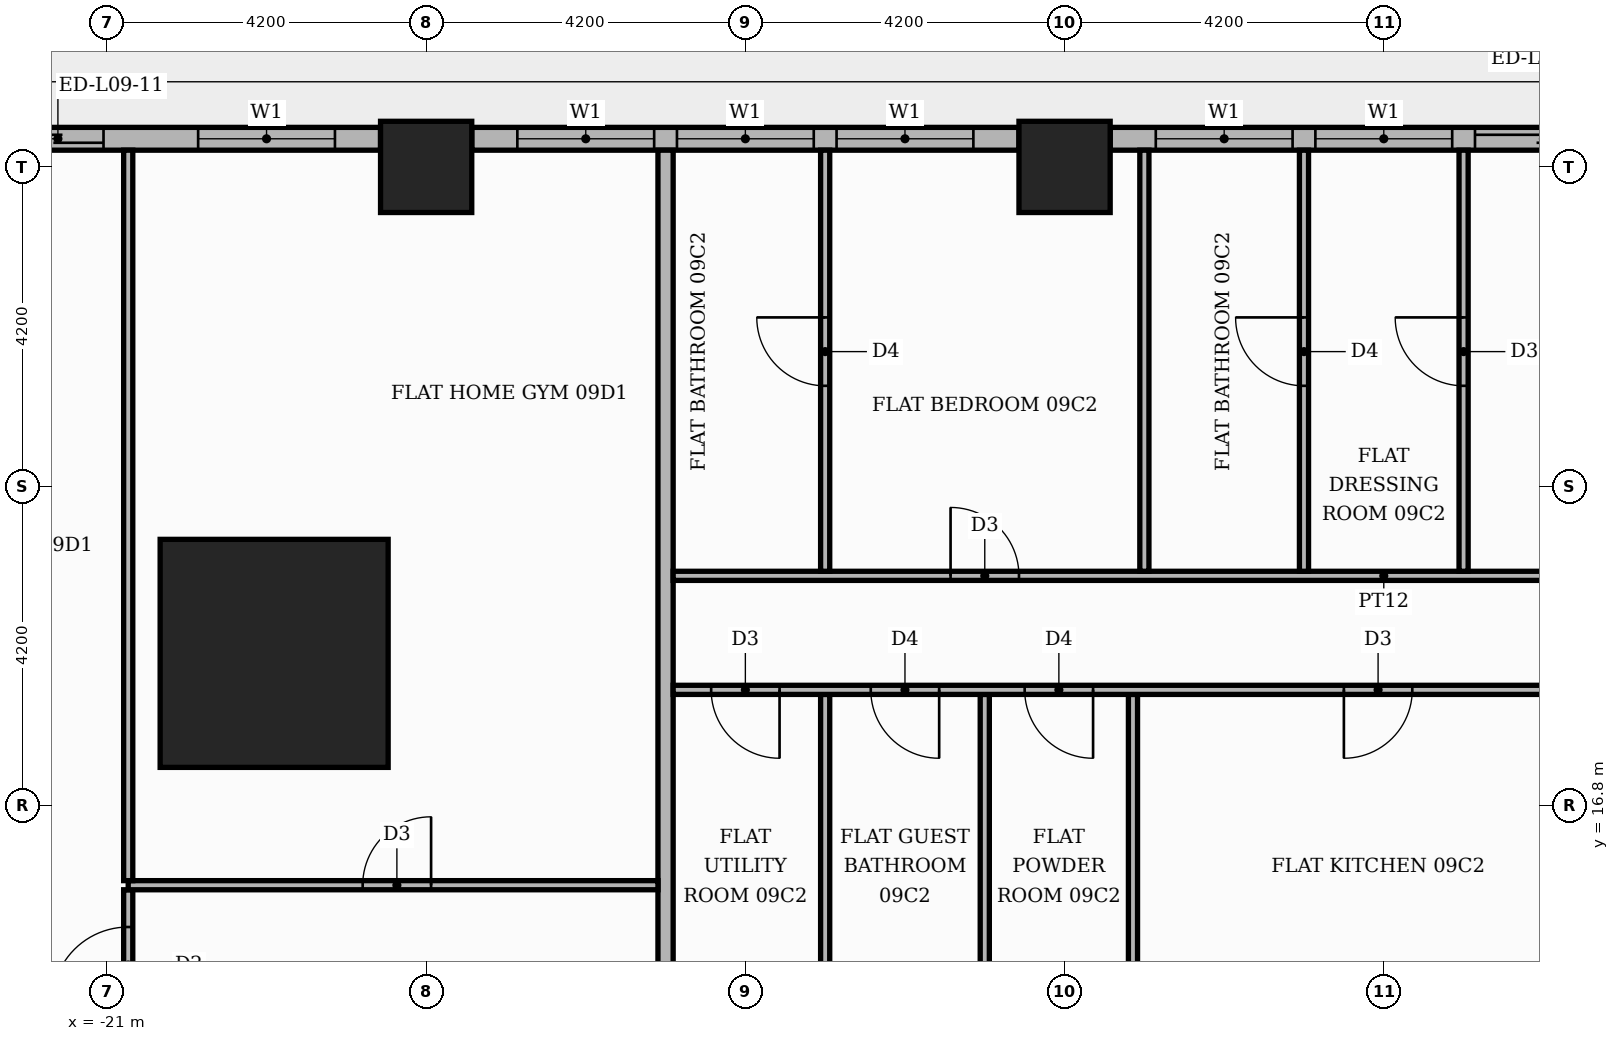
"""IFC4 building model, lengths in metres.
Left out: names, types, materials, properties, quantities, classifications, styles, units other than length and angle.
Written with IfcOpenShell. Run it as: python <this file> out.ifc"""

import sys

from ifc_helpers import new_model, si_unit, direction, frame, frame_2d, origin, origin_2d, place, context, subcontext, project, spatial, rectangle, extrude, element, fill, save


model = new_model("IFC4")
c1 = context("Model", 3, precision=1e-05, world=origin(), true_north=direction((0.0, 1.0)))
c2 = subcontext(c1, "Body", "Model", "MODEL_VIEW")
j1 = project(units=[si_unit("LENGTHUNIT", "METRE"), si_unit("PLANEANGLEUNIT", "RADIAN")], contexts=[c1])
p1 = place(None, origin())
s1 = spatial("IfcSite", under=j1, at=p1, CompositionType="ELEMENT")
p2 = place(p1, origin())
s2 = spatial("IfcBuilding", under=s1, at=p2, CompositionType="ELEMENT")
p3 = place(p2, frame((0.0, 0.0, 42.6)))
s3 = spatial("IfcBuildingStorey", under=s2, at=p3, CompositionType="ELEMENT", Elevation=42.6)
p4 = place(p3, frame((-18.8, 18.8, 0.0), z_axis=(0.0, 0.0, 1.0), x_axis=(1.0, 0.0, 0.0)))
e1 = element("IfcColumn", 1, at=p4, inside=s3, PredefinedType="COLUMN", context=c2, shape_type="SweptSolid", body=[
    extrude(rectangle(XDim=3.0, YDim=3.0, at=origin_2d()), origin(), (0.0, 0.0, 1.0), 3.9),
])
for number, where, z_axis, x_axis in (
    (2, (-8.4, 25.2, 0.0), (0.0, 0.0, 1.0), (1.0, 0.0, 0.0)),
    (3, (-16.8, 25.2, 0.0), (0.0, 0.0, 1.0), (1.0, 0.0, 0.0)),
):
    element("IfcColumn", number, at=place(p3, frame(where, z_axis=z_axis, x_axis=x_axis)), inside=s3, PredefinedType="COLUMN", context=c2, shape_type="SweptSolid", body=[
        extrude(rectangle(XDim=1.2, YDim=1.2, at=origin_2d()), origin(), (0.0, 0.0, 1.0), 3.9),
    ])
p5 = place(p3, frame((-0.6, 25.57, 0.0), z_axis=(0.0, 0.0, 1.0), x_axis=(-1.0, 0.0, 0.0)))
e4 = element("IfcWall", 4, at=p5, inside=s3, PredefinedType="STANDARD", context=c2, shape_type="SweptSolid", body=[
    extrude(rectangle(XDim=7.2, YDim=0.3, at=frame_2d((3.6, 0.0))), origin(), (0.0, 0.0, 1.0), 3.48),
])
p6 = place(p5, frame((0.6, 0.0, 0.0)))
e5 = element("IfcOpeningElement", 5, at=p6, cuts=e4, PredefinedType="OPENING", context=c2, shape_type="SweptSolid", body=[
    extrude(rectangle(XDim=1.8, YDim=2.4, at=frame_2d((0.9, 1.2))), frame((0.0, 0.16, 0.0), z_axis=(0.0, -1.0, 0.0), x_axis=(1.0, 0.0, 0.0)), (0.0, 0.0, 1.0), 0.32),
])
p7 = place(p5, frame((2.7, 0.0, 0.9)))
e6 = element("IfcOpeningElement", 6, at=p7, cuts=e4, PredefinedType="OPENING", context=c2, shape_type="SweptSolid", body=[
    extrude(rectangle(XDim=1.8, YDim=2.1, at=frame_2d((0.9, 1.05))), frame((0.0, 0.16, 0.0), z_axis=(0.0, -1.0, 0.0), x_axis=(1.0, 0.0, 0.0)), (0.0, 0.0, 1.0), 0.32),
])
p8 = place(p5, frame((4.8, 0.0, 0.9)))
e7 = element("IfcOpeningElement", 7, at=p8, cuts=e4, PredefinedType="OPENING", context=c2, shape_type="SweptSolid", body=[
    extrude(rectangle(XDim=1.8, YDim=2.1, at=frame_2d((0.9, 1.05))), frame((0.0, 0.16, 0.0), z_axis=(0.0, -1.0, 0.0), x_axis=(1.0, 0.0, 0.0)), (0.0, 0.0, 1.0), 0.32),
])
p9 = place(p3, frame((-9.0, 25.57, 0.0), z_axis=(0.0, 0.0, 1.0), x_axis=(-1.0, 0.0, 0.0)))
e8 = element("IfcWall", 8, at=p9, inside=s3, PredefinedType="STANDARD", context=c2, shape_type="SweptSolid", body=[
    extrude(rectangle(XDim=7.2, YDim=0.3, at=frame_2d((3.6, 0.0))), origin(), (0.0, 0.0, 1.0), 3.48),
])
p10 = place(p9, frame((0.6, 0.0, 0.9)))
e9 = element("IfcOpeningElement", 9, at=p10, cuts=e8, PredefinedType="OPENING", context=c2, shape_type="SweptSolid", body=[
    extrude(rectangle(XDim=1.8, YDim=2.1, at=frame_2d((0.9, 1.05))), frame((0.0, 0.16, 0.0), z_axis=(0.0, -1.0, 0.0), x_axis=(1.0, 0.0, 0.0)), (0.0, 0.0, 1.0), 0.32),
])
p11 = place(p9, frame((2.7, 0.0, 0.9)))
e10 = element("IfcOpeningElement", 10, at=p11, cuts=e8, PredefinedType="OPENING", context=c2, shape_type="SweptSolid", body=[
    extrude(rectangle(XDim=1.8, YDim=2.1, at=frame_2d((0.9, 1.05))), frame((0.0, 0.16, 0.0), z_axis=(0.0, -1.0, 0.0), x_axis=(1.0, 0.0, 0.0)), (0.0, 0.0, 1.0), 0.32),
])
p12 = place(p9, frame((4.8, 0.0, 0.9)))
e11 = element("IfcOpeningElement", 11, at=p12, cuts=e8, PredefinedType="OPENING", context=c2, shape_type="SweptSolid", body=[
    extrude(rectangle(XDim=1.8, YDim=2.1, at=frame_2d((0.9, 1.05))), frame((0.0, 0.16, 0.0), z_axis=(0.0, -1.0, 0.0), x_axis=(1.0, 0.0, 0.0)), (0.0, 0.0, 1.0), 0.32),
])
p13 = place(p3, frame((-17.4, 25.57, 0.0), z_axis=(0.0, 0.0, 1.0), x_axis=(-1.0, 0.0, 0.0)))
e12 = element("IfcWall", 12, at=p13, inside=s3, PredefinedType="STANDARD", context=c2, shape_type="SweptSolid", body=[
    extrude(rectangle(XDim=5.32, YDim=0.3, at=frame_2d((2.66, 0.0))), origin(), (0.0, 0.0, 1.0), 3.48),
])
p14 = place(p13, frame((0.6, 0.0, 0.9)))
e13 = element("IfcOpeningElement", 13, at=p14, cuts=e12, PredefinedType="OPENING", context=c2, shape_type="SweptSolid", body=[
    extrude(rectangle(XDim=1.8, YDim=2.1, at=frame_2d((0.9, 1.05))), frame((0.0, 0.16, 0.0), z_axis=(0.0, -1.0, 0.0), x_axis=(1.0, 0.0, 0.0)), (0.0, 0.0, 1.0), 0.32),
])
p15 = place(p13, frame((3.645, 0.0, 0.0)))
e14 = element("IfcOpeningElement", 14, at=p15, cuts=e12, PredefinedType="OPENING", context=c2, shape_type="SweptSolid", body=[
    extrude(rectangle(XDim=1.2, YDim=2.4, at=frame_2d((0.6, 1.2))), frame((0.0, 0.16, 0.0), z_axis=(0.0, -1.0, 0.0), x_axis=(1.0, 0.0, 0.0)), (0.0, 0.0, 1.0), 0.32),
])
p16 = place(p3, frame((-20.72, 13.71, 0.0), z_axis=(0.0, 0.0, 1.0), x_axis=(0.0, 1.0, 0.0)))
e15 = element("IfcWall", 15, at=p16, inside=s3, PredefinedType="PARTITIONING", context=c2, shape_type="SweptSolid", body=[
    extrude(rectangle(XDim=1.98, YDim=0.12, at=frame_2d((0.99, 0.0))), origin(), (0.0, 0.0, 1.0), 3.48),
])
p17 = place(p16, frame((0.49, 0.0, 0.0)))
e16 = element("IfcOpeningElement", 16, at=p17, cuts=e15, PredefinedType="OPENING", context=c2, shape_type="SweptSolid", body=[
    extrude(rectangle(XDim=1.0, YDim=2.1, at=frame_2d((0.5, 1.05))), frame((0.0, 0.07, 0.0), z_axis=(0.0, -1.0, 0.0), x_axis=(1.0, 0.0, 0.0)), (0.0, 0.0, 1.0), 0.14),
])
p18 = place(p3, frame((-13.65, 13.75, 0.0), z_axis=(0.0, 0.0, 1.0), x_axis=(0.0, 1.0, 0.0)))
e17 = element("IfcWall", 17, at=p18, inside=s3, PredefinedType="PARTITIONING", context=c2, shape_type="SweptSolid", body=[
    extrude(rectangle(XDim=11.67, YDim=0.2, at=frame_2d((5.835, 0.0))), origin(), (0.0, 0.0, 1.0), 3.48),
])
for number, where, z_axis, x_axis in (
    (18, (-11.55, 13.75, 0.0), (0.0, 0.0, 1.0), (0.0, 1.0, 0.0)),
    (19, (-9.45, 13.75, 0.0), (0.0, 0.0, 1.0), (0.0, 1.0, 0.0)),
    (20, (-7.5, 13.75, 0.0), (0.0, 0.0, 1.0), (0.0, 1.0, 0.0)),
):
    element("IfcWall", number, at=place(p3, frame(where, z_axis=z_axis, x_axis=x_axis)), inside=s3, PredefinedType="PARTITIONING", context=c2, shape_type="SweptSolid", body=[
        extrude(rectangle(XDim=4.51, YDim=0.12, at=frame_2d((2.255, 0.0))), origin(), (0.0, 0.0, 1.0), 3.48),
    ])
p19 = place(p3, frame((-20.72, 15.75, 0.0), z_axis=(0.0, 0.0, 1.0), x_axis=(1.0, 0.0, 0.0)))
e21 = element("IfcWall", 21, at=p19, inside=s3, PredefinedType="PARTITIONING", context=c2, shape_type="SweptSolid", body=[
    extrude(rectangle(XDim=6.97, YDim=0.12, at=frame_2d((3.485, 0.0))), origin(), (0.0, 0.0, 1.0), 3.48),
])
p20 = place(p19, frame((3.085, 0.0, 0.0)))
e22 = element("IfcOpeningElement", 22, at=p20, cuts=e21, PredefinedType="OPENING", context=c2, shape_type="SweptSolid", body=[
    extrude(rectangle(XDim=0.9, YDim=2.1, at=frame_2d((0.45, 1.05))), frame((0.0, 0.07, 0.0), z_axis=(0.0, -1.0, 0.0), x_axis=(1.0, 0.0, 0.0)), (0.0, 0.0, 1.0), 0.14),
])
p21 = place(p3, frame((-20.72, 15.81, 0.0), z_axis=(0.0, 0.0, 1.0), x_axis=(0.0, 1.0, 0.0)))
e23 = element("IfcWall", 23, at=p21, inside=s3, PredefinedType="PARTITIONING", context=c2, shape_type="SweptSolid", body=[
    extrude(rectangle(XDim=9.61, YDim=0.12, at=frame_2d((4.805, 0.0))), origin(), (0.0, 0.0, 1.0), 3.48),
])
p22 = place(p3, frame((-13.55, 18.32, 0.0), z_axis=(0.0, 0.0, 1.0), x_axis=(1.0, 0.0, 0.0)))
e24 = element("IfcWall", 24, at=p22, inside=s3, PredefinedType="PARTITIONING", context=c2, shape_type="SweptSolid", body=[
    extrude(rectangle(XDim=12.5, YDim=0.12, at=frame_2d((6.25, 0.0))), origin(), (0.0, 0.0, 1.0), 3.48),
])
p23 = place(p22, frame((8.825, 0.0, 0.0)))
e25 = element("IfcOpeningElement", 25, at=p23, cuts=e24, PredefinedType="OPENING", context=c2, shape_type="SweptSolid", body=[
    extrude(rectangle(XDim=0.9, YDim=2.1, at=frame_2d((0.45, 1.05))), frame((0.0, 0.07, 0.0), z_axis=(0.0, -1.0, 0.0), x_axis=(1.0, 0.0, 0.0)), (0.0, 0.0, 1.0), 0.14),
])
p24 = place(p22, frame((4.625, 0.0, 0.0)))
e26 = element("IfcOpeningElement", 26, at=p24, cuts=e24, PredefinedType="OPENING", context=c2, shape_type="SweptSolid", body=[
    extrude(rectangle(XDim=0.9, YDim=2.1, at=frame_2d((0.45, 1.05))), frame((0.0, 0.07, 0.0), z_axis=(0.0, -1.0, 0.0), x_axis=(1.0, 0.0, 0.0)), (0.0, 0.0, 1.0), 0.14),
])
p25 = place(p22, frame((2.6, 0.0, 0.0)))
e27 = element("IfcOpeningElement", 27, at=p25, cuts=e24, PredefinedType="OPENING", context=c2, shape_type="SweptSolid", body=[
    extrude(rectangle(XDim=0.9, YDim=2.1, at=frame_2d((0.45, 1.05))), frame((0.0, 0.07, 0.0), z_axis=(0.0, -1.0, 0.0), x_axis=(1.0, 0.0, 0.0)), (0.0, 0.0, 1.0), 0.14),
])
p26 = place(p22, frame((0.5, 0.0, 0.0)))
e28 = element("IfcOpeningElement", 28, at=p26, cuts=e24, PredefinedType="OPENING", context=c2, shape_type="SweptSolid", body=[
    extrude(rectangle(XDim=0.9, YDim=2.1, at=frame_2d((0.45, 1.05))), frame((0.0, 0.07, 0.0), z_axis=(0.0, -1.0, 0.0), x_axis=(1.0, 0.0, 0.0)), (0.0, 0.0, 1.0), 0.14),
])
p27 = place(p3, frame((-13.55, 19.82, 0.0), z_axis=(0.0, 0.0, 1.0), x_axis=(1.0, 0.0, 0.0)))
e29 = element("IfcWall", 29, at=p27, inside=s3, PredefinedType="PARTITIONING", context=c2, shape_type="SweptSolid", body=[
    extrude(rectangle(XDim=18.7, YDim=0.12, at=frame_2d((9.35, 0.0))), origin(), (0.0, 0.0, 1.0), 3.48),
])
p28 = place(p27, frame((16.2, 0.0, 0.0)))
e30 = element("IfcOpeningElement", 30, at=p28, cuts=e29, PredefinedType="OPENING", context=c2, shape_type="SweptSolid", body=[
    extrude(rectangle(XDim=1.0, YDim=2.1, at=frame_2d((0.5, 1.05))), frame((0.0, 0.07, 0.0), z_axis=(0.0, -1.0, 0.0), x_axis=(1.0, 0.0, 0.0)), (0.0, 0.0, 1.0), 0.14),
])
p29 = place(p27, frame((12.05, 0.0, 0.0)))
e31 = element("IfcOpeningElement", 31, at=p29, cuts=e29, PredefinedType="OPENING", context=c2, shape_type="SweptSolid", body=[
    extrude(rectangle(XDim=0.9, YDim=2.1, at=frame_2d((0.45, 1.05))), frame((0.0, 0.07, 0.0), z_axis=(0.0, -1.0, 0.0), x_axis=(1.0, 0.0, 0.0)), (0.0, 0.0, 1.0), 0.14),
])
p30 = place(p27, frame((3.65, 0.0, 0.0)))
e32 = element("IfcOpeningElement", 32, at=p30, cuts=e29, PredefinedType="OPENING", context=c2, shape_type="SweptSolid", body=[
    extrude(rectangle(XDim=0.9, YDim=2.1, at=frame_2d((0.45, 1.05))), frame((0.0, 0.07, 0.0), z_axis=(0.0, -1.0, 0.0), x_axis=(1.0, 0.0, 0.0)), (0.0, 0.0, 1.0), 0.14),
])
p31 = place(p3, frame((-11.55, 19.88, 0.0), z_axis=(0.0, 0.0, 1.0), x_axis=(0.0, 1.0, 0.0)))
e33 = element("IfcWall", 33, at=p31, inside=s3, PredefinedType="PARTITIONING", context=c2, shape_type="SweptSolid", body=[
    extrude(rectangle(XDim=5.54, YDim=0.12, at=frame_2d((2.77, 0.0))), origin(), (0.0, 0.0, 1.0), 3.48),
])
p32 = place(p31, frame((2.44, 0.0, 0.0)))
e34 = element("IfcOpeningElement", 34, at=p32, cuts=e33, PredefinedType="OPENING", context=c2, shape_type="SweptSolid", body=[
    extrude(rectangle(XDim=0.9, YDim=2.1, at=frame_2d((0.45, 1.05))), frame((0.0, 0.07, 0.0), z_axis=(0.0, -1.0, 0.0), x_axis=(1.0, 0.0, 0.0)), (0.0, 0.0, 1.0), 0.14),
])
p33 = place(p3, frame((-7.35, 19.88, 0.0), z_axis=(0.0, 0.0, 1.0), x_axis=(0.0, 1.0, 0.0)))
e35 = element("IfcWall", 35, at=p33, inside=s3, PredefinedType="PARTITIONING", context=c2, shape_type="SweptSolid", body=[
    extrude(rectangle(XDim=5.54, YDim=0.12, at=frame_2d((2.77, 0.0))), origin(), (0.0, 0.0, 1.0), 3.48),
])
p34 = place(p3, frame((-5.25, 19.88, 0.0), z_axis=(0.0, 0.0, 1.0), x_axis=(0.0, 1.0, 0.0)))
e36 = element("IfcWall", 36, at=p34, inside=s3, PredefinedType="PARTITIONING", context=c2, shape_type="SweptSolid", body=[
    extrude(rectangle(XDim=5.54, YDim=0.12, at=frame_2d((2.77, 0.0))), origin(), (0.0, 0.0, 1.0), 3.48),
])
p35 = place(p34, frame((2.44, 0.0, 0.0)))
e37 = element("IfcOpeningElement", 37, at=p35, cuts=e36, PredefinedType="OPENING", context=c2, shape_type="SweptSolid", body=[
    extrude(rectangle(XDim=0.9, YDim=2.1, at=frame_2d((0.45, 1.05))), frame((0.0, 0.07, 0.0), z_axis=(0.0, -1.0, 0.0), x_axis=(1.0, 0.0, 0.0)), (0.0, 0.0, 1.0), 0.14),
])
p36 = place(p3, frame((-3.15, 19.88, 0.0), z_axis=(0.0, 0.0, 1.0), x_axis=(0.0, 1.0, 0.0)))
e38 = element("IfcWall", 38, at=p36, inside=s3, PredefinedType="PARTITIONING", context=c2, shape_type="SweptSolid", body=[
    extrude(rectangle(XDim=5.54, YDim=0.12, at=frame_2d((2.77, 0.0))), origin(), (0.0, 0.0, 1.0), 3.48),
])
p37 = place(p36, frame((2.44, 0.0, 0.0)))
e39 = element("IfcOpeningElement", 39, at=p37, cuts=e38, PredefinedType="OPENING", context=c2, shape_type="SweptSolid", body=[
    extrude(rectangle(XDim=0.9, YDim=2.1, at=frame_2d((0.45, 1.05))), frame((0.0, 0.07, 0.0), z_axis=(0.0, -1.0, 0.0), x_axis=(1.0, 0.0, 0.0)), (0.0, 0.0, 1.0), 0.14),
])
p38 = place(p6, origin())
e40 = element("IfcDoor", 40, at=p38, inside=s3, OperationType="SLIDING_TO_LEFT", PredefinedType="DOOR", context=c2, shape_type="SweptSolid", body=[
    extrude(rectangle(XDim=1.8, YDim=2.4, at=frame_2d((0.9, 1.2))), frame((0.0, 0.025, 0.0), z_axis=(0.0, -1.0, 0.0), x_axis=(1.0, 0.0, 0.0)), (0.0, 0.0, 1.0), 0.05),
])
fill(e5, e40)
p39 = place(p7, origin())
e41 = element("IfcWindow", 41, at=p39, inside=s3, PartitioningType="SINGLE_PANEL", PredefinedType="WINDOW", context=c2, shape_type="SweptSolid", body=[
    extrude(rectangle(XDim=1.8, YDim=2.1, at=frame_2d((0.9, 1.05))), frame((0.0, 0.03, 0.0), z_axis=(0.0, -1.0, 0.0), x_axis=(1.0, 0.0, 0.0)), (0.0, 0.0, 1.0), 0.06),
])
fill(e6, e41)
p40 = place(p8, origin())
e42 = element("IfcWindow", 42, at=p40, inside=s3, PartitioningType="SINGLE_PANEL", PredefinedType="WINDOW", context=c2, shape_type="SweptSolid", body=[
    extrude(rectangle(XDim=1.8, YDim=2.1, at=frame_2d((0.9, 1.05))), frame((0.0, 0.03, 0.0), z_axis=(0.0, -1.0, 0.0), x_axis=(1.0, 0.0, 0.0)), (0.0, 0.0, 1.0), 0.06),
])
fill(e7, e42)
p41 = place(p10, origin())
e43 = element("IfcWindow", 43, at=p41, inside=s3, PartitioningType="SINGLE_PANEL", PredefinedType="WINDOW", context=c2, shape_type="SweptSolid", body=[
    extrude(rectangle(XDim=1.8, YDim=2.1, at=frame_2d((0.9, 1.05))), frame((0.0, 0.03, 0.0), z_axis=(0.0, -1.0, 0.0), x_axis=(1.0, 0.0, 0.0)), (0.0, 0.0, 1.0), 0.06),
])
fill(e9, e43)
p42 = place(p11, origin())
e44 = element("IfcWindow", 44, at=p42, inside=s3, PartitioningType="SINGLE_PANEL", PredefinedType="WINDOW", context=c2, shape_type="SweptSolid", body=[
    extrude(rectangle(XDim=1.8, YDim=2.1, at=frame_2d((0.9, 1.05))), frame((0.0, 0.03, 0.0), z_axis=(0.0, -1.0, 0.0), x_axis=(1.0, 0.0, 0.0)), (0.0, 0.0, 1.0), 0.06),
])
fill(e10, e44)
p43 = place(p12, origin())
e45 = element("IfcWindow", 45, at=p43, inside=s3, PartitioningType="SINGLE_PANEL", PredefinedType="WINDOW", context=c2, shape_type="SweptSolid", body=[
    extrude(rectangle(XDim=1.8, YDim=2.1, at=frame_2d((0.9, 1.05))), frame((0.0, 0.03, 0.0), z_axis=(0.0, -1.0, 0.0), x_axis=(1.0, 0.0, 0.0)), (0.0, 0.0, 1.0), 0.06),
])
fill(e11, e45)
p44 = place(p14, origin())
e46 = element("IfcWindow", 46, at=p44, inside=s3, PartitioningType="SINGLE_PANEL", PredefinedType="WINDOW", context=c2, shape_type="SweptSolid", body=[
    extrude(rectangle(XDim=1.8, YDim=2.1, at=frame_2d((0.9, 1.05))), frame((0.0, 0.03, 0.0), z_axis=(0.0, -1.0, 0.0), x_axis=(1.0, 0.0, 0.0)), (0.0, 0.0, 1.0), 0.06),
])
fill(e13, e46)
p45 = place(p15, origin())
e47 = element("IfcDoor", 47, at=p45, inside=s3, OperationType="SLIDING_TO_RIGHT", PredefinedType="DOOR", context=c2, shape_type="SweptSolid", body=[
    extrude(rectangle(XDim=1.2, YDim=2.4, at=frame_2d((0.6, 1.2))), frame((0.0, 0.025, 0.0), z_axis=(0.0, -1.0, 0.0), x_axis=(1.0, 0.0, 0.0)), (0.0, 0.0, 1.0), 0.05),
])
fill(e14, e47)
p46 = place(p23, frame((0.9, 0.0, 0.0), z_axis=(0.0, 0.0, 1.0), x_axis=(-1.0, 0.0, 0.0)))
e48 = element("IfcDoor", 48, at=p46, inside=s3, OperationType="SINGLE_SWING_LEFT", PredefinedType="DOOR", context=c2, shape_type="SweptSolid", body=[
    extrude(rectangle(XDim=0.9, YDim=2.1, at=frame_2d((0.45, 1.05))), frame((0.0, 0.025, 0.0), z_axis=(0.0, -1.0, 0.0), x_axis=(1.0, 0.0, 0.0)), (0.0, 0.0, 1.0), 0.05),
])
fill(e25, e48)
p47 = place(p24, frame((0.9, 0.0, 0.0), z_axis=(0.0, 0.0, 1.0), x_axis=(-1.0, 0.0, 0.0)))
e49 = element("IfcDoor", 49, at=p47, inside=s3, OperationType="SINGLE_SWING_RIGHT", PredefinedType="DOOR", context=c2, shape_type="SweptSolid", body=[
    extrude(rectangle(XDim=0.9, YDim=2.1, at=frame_2d((0.45, 1.05))), frame((0.0, 0.025, 0.0), z_axis=(0.0, -1.0, 0.0), x_axis=(1.0, 0.0, 0.0)), (0.0, 0.0, 1.0), 0.05),
])
fill(e26, e49)
p48 = place(p25, frame((0.9, 0.0, 0.0), z_axis=(0.0, 0.0, 1.0), x_axis=(-1.0, 0.0, 0.0)))
e50 = element("IfcDoor", 50, at=p48, inside=s3, OperationType="SINGLE_SWING_RIGHT", PredefinedType="DOOR", context=c2, shape_type="SweptSolid", body=[
    extrude(rectangle(XDim=0.9, YDim=2.1, at=frame_2d((0.45, 1.05))), frame((0.0, 0.025, 0.0), z_axis=(0.0, -1.0, 0.0), x_axis=(1.0, 0.0, 0.0)), (0.0, 0.0, 1.0), 0.05),
])
fill(e27, e50)
p49 = place(p26, frame((0.9, 0.0, 0.0), z_axis=(0.0, 0.0, 1.0), x_axis=(-1.0, 0.0, 0.0)))
e51 = element("IfcDoor", 51, at=p49, inside=s3, OperationType="SINGLE_SWING_RIGHT", PredefinedType="DOOR", context=c2, shape_type="SweptSolid", body=[
    extrude(rectangle(XDim=0.9, YDim=2.1, at=frame_2d((0.45, 1.05))), frame((0.0, 0.025, 0.0), z_axis=(0.0, -1.0, 0.0), x_axis=(1.0, 0.0, 0.0)), (0.0, 0.0, 1.0), 0.05),
])
fill(e28, e51)
p50 = place(p37, origin())
e52 = element("IfcDoor", 52, at=p50, inside=s3, OperationType="SINGLE_SWING_RIGHT", PredefinedType="DOOR", context=c2, shape_type="SweptSolid", body=[
    extrude(rectangle(XDim=0.9, YDim=2.1, at=frame_2d((0.45, 1.05))), frame((0.0, 0.025, 0.0), z_axis=(0.0, -1.0, 0.0), x_axis=(1.0, 0.0, 0.0)), (0.0, 0.0, 1.0), 0.05),
])
fill(e39, e52)
p51 = place(p35, origin())
e53 = element("IfcDoor", 53, at=p51, inside=s3, OperationType="SINGLE_SWING_RIGHT", PredefinedType="DOOR", context=c2, shape_type="SweptSolid", body=[
    extrude(rectangle(XDim=0.9, YDim=2.1, at=frame_2d((0.45, 1.05))), frame((0.0, 0.025, 0.0), z_axis=(0.0, -1.0, 0.0), x_axis=(1.0, 0.0, 0.0)), (0.0, 0.0, 1.0), 0.05),
])
fill(e37, e53)
p52 = place(p30, origin())
e54 = element("IfcDoor", 54, at=p52, inside=s3, OperationType="SINGLE_SWING_LEFT", PredefinedType="DOOR", context=c2, shape_type="SweptSolid", body=[
    extrude(rectangle(XDim=0.9, YDim=2.1, at=frame_2d((0.45, 1.05))), frame((0.0, 0.025, 0.0), z_axis=(0.0, -1.0, 0.0), x_axis=(1.0, 0.0, 0.0)), (0.0, 0.0, 1.0), 0.05),
])
fill(e32, e54)
p53 = place(p32, origin())
e55 = element("IfcDoor", 55, at=p53, inside=s3, OperationType="SINGLE_SWING_RIGHT", PredefinedType="DOOR", context=c2, shape_type="SweptSolid", body=[
    extrude(rectangle(XDim=0.9, YDim=2.1, at=frame_2d((0.45, 1.05))), frame((0.0, 0.025, 0.0), z_axis=(0.0, -1.0, 0.0), x_axis=(1.0, 0.0, 0.0)), (0.0, 0.0, 1.0), 0.05),
])
fill(e34, e55)
p54 = place(p20, origin())
e56 = element("IfcDoor", 56, at=p54, inside=s3, OperationType="SINGLE_SWING_RIGHT", PredefinedType="DOOR", context=c2, shape_type="SweptSolid", body=[
    extrude(rectangle(XDim=0.9, YDim=2.1, at=frame_2d((0.45, 1.05))), frame((0.0, 0.025, 0.0), z_axis=(0.0, -1.0, 0.0), x_axis=(1.0, 0.0, 0.0)), (0.0, 0.0, 1.0), 0.05),
])
fill(e22, e56)
p55 = place(p17, origin())
e57 = element("IfcDoor", 57, at=p55, inside=s3, OperationType="SINGLE_SWING_LEFT", PredefinedType="DOOR", context=c2, shape_type="SweptSolid", body=[
    extrude(rectangle(XDim=1.0, YDim=2.1, at=frame_2d((0.5, 1.05))), frame((0.0, 0.025, 0.0), z_axis=(0.0, -1.0, 0.0), x_axis=(1.0, 0.0, 0.0)), (0.0, 0.0, 1.0), 0.05),
])
fill(e16, e57)
save(model, sys.argv[1])
